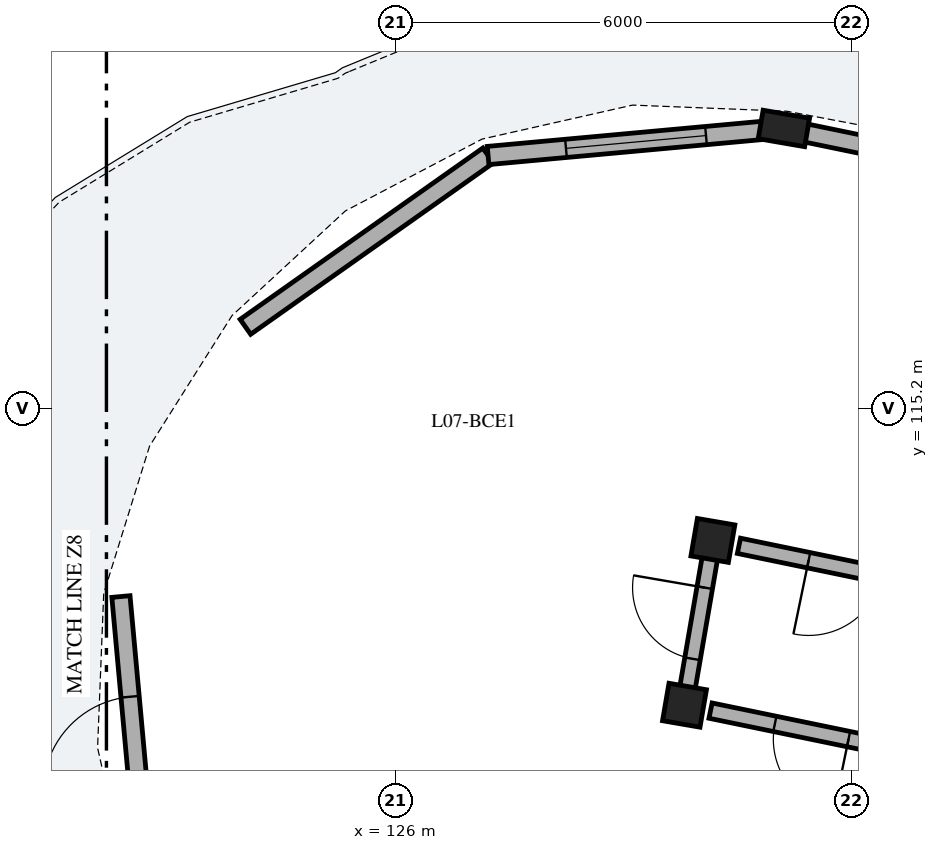
"""IFC4 building model, lengths in metres.
Left out: names, types, materials, properties, quantities, classifications, styles, units other than length and angle.
Written with IfcOpenShell. Run it as: python <this file> out.ifc"""

import sys

from ifc_helpers import new_model, si_unit, direction, frame, frame_2d, origin, origin_2d, place, context, subcontext, project, spatial, rectangle, extrude, element, fill, save


model = new_model("IFC4")
c1 = context("Model", 3, precision=1e-05, world=origin(), true_north=direction((0.0, 1.0)))
c2 = subcontext(c1, "Body", "Model", "MODEL_VIEW")
j1 = project(units=[si_unit("LENGTHUNIT", "METRE"), si_unit("PLANEANGLEUNIT", "RADIAN")], contexts=[c1])
p1 = place(None, origin())
s1 = spatial("IfcSite", under=j1, at=p1, CompositionType="ELEMENT")
p2 = place(p1, origin())
s2 = spatial("IfcBuilding", under=s1, at=p2, CompositionType="ELEMENT")
p3 = place(p2, frame((0.0, 0.0, 25.64)))
s3 = spatial("IfcBuildingStorey", under=s2, at=p3, CompositionType="ELEMENT", Elevation=25.64)
for number, where, z_axis, x_axis in (
    (1, (129.806, 111.297, 0.0), (0.0, 0.0, 1.0), (0.17, 0.985, 0.0)),
    (2, (130.179, 113.465, 0.0), (0.0, 0.0, 1.0), (0.17, 0.985, 0.0)),
):
    element("IfcColumn", number, at=place(p3, frame(where, z_axis=z_axis, x_axis=x_axis)), inside=s3, PredefinedType="COLUMN", context=c2, shape_type="SweptSolid", body=[
        extrude(rectangle(XDim=0.5, YDim=0.5, at=origin_2d()), origin(), (0.0, 0.0, 1.0), 3.11),
    ])
p4 = place(p3, frame((131.113, 118.885, 0.0), z_axis=(0.0, 0.0, 1.0), x_axis=(0.169827230012, 0.985473851478, 0.0)))
e3 = element("IfcColumn", 3, at=p4, inside=s3, PredefinedType="PILASTER", context=c2, shape_type="SweptSolid", body=[
    extrude(rectangle(XDim=0.38, YDim=0.62, at=origin_2d()), origin(), (0.0, 0.0, 1.0), 3.11),
])
p5 = place(p3, frame((134.742, 118.135, 0.0), z_axis=(0.0, 0.0, 1.0), x_axis=(-0.97933807536, 0.202229904193, 0.0)))
e4 = element("IfcWall", 4, at=p5, inside=s3, PredefinedType="SOLIDWALL", context=c2, shape_type="SweptSolid", body=[
    extrude(rectangle(XDim=3.546, YDim=0.24, at=frame_2d((1.773, 0.0))), origin(), (0.0, 0.0, 1.0), 2.355),
])
p6 = place(p5, frame((1.113, 0.0, 0.55)))
e5 = element("IfcOpeningElement", 5, at=p6, cuts=e4, PredefinedType="OPENING", context=c2, shape_type="SweptSolid", body=[
    extrude(rectangle(XDim=1.32, YDim=1.585, at=frame_2d((0.66, 0.792))), frame((0.0, 0.13, 0.0), z_axis=(0.0, -1.0, 0.0), x_axis=(1.0, 0.0, 0.0)), (0.0, 0.0, 1.0), 0.26),
])
p7 = place(p3, frame((122.746, 108.835, 0.0), z_axis=(0.0, 0.0, 1.0), x_axis=(-0.091020141047, 0.995849051776, 0.0)))
e6 = element("IfcWall", 6, at=p7, inside=s3, PredefinedType="SOLIDWALL", context=c2, shape_type="SweptSolid", body=[
    extrude(rectangle(XDim=3.908, YDim=0.24, at=frame_2d((1.954, 0.0))), origin(), (0.0, 0.0, 1.0), 2.355),
])
p8 = place(p7, frame((1.324, 0.0, 0.0)))
e7 = element("IfcOpeningElement", 7, at=p8, cuts=e6, PredefinedType="OPENING", context=c2, shape_type="SweptSolid", body=[
    extrude(rectangle(XDim=1.26, YDim=2.18, at=frame_2d((0.63, 1.09))), frame((0.0, 0.13, 0.0), z_axis=(0.0, -1.0, 0.0), x_axis=(1.0, 0.0, 0.0)), (0.0, 0.0, 1.0), 0.26),
])
p9 = place(p3, frame((124.029, 116.275, 0.0), z_axis=(0.0, 0.0, 1.0), x_axis=(0.816903802512, 0.576773939634, 0.0)))
e8 = element("IfcWall", 8, at=p9, inside=s3, PredefinedType="SOLIDWALL", context=c2, shape_type="SweptSolid", body=[
    extrude(rectangle(XDim=3.908, YDim=0.24, at=frame_2d((1.954, 0.0))), origin(), (0.0, 0.0, 1.0), 2.355),
])
p10 = place(p3, frame((127.221, 118.529, 0.0), z_axis=(0.0, 0.0, 1.0), x_axis=(0.995849569279, 0.091014478888, 0.0)))
e9 = element("IfcWall", 9, at=p10, inside=s3, PredefinedType="SOLIDWALL", context=c2, shape_type="SweptSolid", body=[
    extrude(rectangle(XDim=3.908, YDim=0.24, at=frame_2d((1.954, 0.0))), origin(), (0.0, 0.0, 1.0), 2.355),
])
p11 = place(p10, frame((1.029, 0.0, 0.4)))
e10 = element("IfcOpeningElement", 10, at=p11, cuts=e9, PredefinedType="OPENING", context=c2, shape_type="SweptSolid", body=[
    extrude(rectangle(XDim=1.85, YDim=1.72, at=frame_2d((0.925, 0.86))), frame((0.0, 0.13, 0.0), z_axis=(0.0, -1.0, 0.0), x_axis=(1.0, 0.0, 0.0)), (0.0, 0.0, 1.0), 0.26),
])
p12 = place(p3, frame((133.326, 112.815, 0.0), z_axis=(0.0, 0.0, 1.0), x_axis=(-0.979348418612, 0.202179808492, 0.0)))
e11 = element("IfcWall", 11, at=p12, inside=s3, PredefinedType="PARTITIONING", context=c2, shape_type="SweptSolid", body=[
    extrude(rectangle(XDim=2.863, YDim=0.205, at=frame_2d((1.432, 0.0))), origin(), (0.0, 0.0, 1.0), 2.37),
])
p13 = place(p12, frame((0.937, 0.0, 0.0)))
e12 = element("IfcOpeningElement", 12, at=p13, cuts=e11, PredefinedType="OPENING", context=c2, shape_type="SweptSolid", body=[
    extrude(rectangle(XDim=0.99, YDim=2.16, at=frame_2d((0.495, 1.08))), frame((0.0, 0.113, 0.0), z_axis=(0.0, -1.0, 0.0), x_axis=(1.0, 0.0, 0.0)), (0.0, 0.0, 1.0), 0.225),
])
p14 = place(p3, frame((132.81, 110.677, 0.0), z_axis=(0.0, 0.0, 1.0), x_axis=(-0.979349423541, 0.202174940608, 0.0)))
e13 = element("IfcWall", 13, at=p14, inside=s3, PredefinedType="PARTITIONING", context=c2, shape_type="SweptSolid", body=[
    extrude(rectangle(XDim=2.718, YDim=0.205, at=frame_2d((1.359, 0.0))), origin(), (0.0, 0.0, 1.0), 2.37),
])
p15 = place(p14, frame((0.864, 0.0, 0.0)))
e14 = element("IfcOpeningElement", 14, at=p15, cuts=e13, PredefinedType="OPENING", context=c2, shape_type="SweptSolid", body=[
    extrude(rectangle(XDim=0.99, YDim=2.16, at=frame_2d((0.495, 1.08))), frame((0.0, 0.113, 0.0), z_axis=(0.0, -1.0, 0.0), x_axis=(1.0, 0.0, 0.0)), (0.0, 0.0, 1.0), 0.225),
])
p16 = place(p3, frame((129.814, 111.346, 0.0), z_axis=(0.0, 0.0, 1.0), x_axis=(0.169864088707, 0.98546749889, 0.0)))
e15 = element("IfcWall", 15, at=p16, inside=s3, PredefinedType="PARTITIONING", context=c2, shape_type="SweptSolid", body=[
    extrude(rectangle(XDim=2.1, YDim=0.205, at=frame_2d((1.05, 0.0))), origin(), (0.0, 0.0, 1.0), 2.37),
])
p17 = place(p16, frame((0.57, 0.0, 0.0)))
e16 = element("IfcOpeningElement", 16, at=p17, cuts=e15, PredefinedType="OPENING", context=c2, shape_type="SweptSolid", body=[
    extrude(rectangle(XDim=0.95, YDim=2.13, at=frame_2d((0.475, 1.065))), frame((0.0, 0.113, 0.0), z_axis=(0.0, -1.0, 0.0), x_axis=(1.0, 0.0, 0.0)), (0.0, 0.0, 1.0), 0.225),
])
p18 = place(p8, origin())
e17 = element("IfcDoor", 17, at=p18, inside=s3, OperationType="SINGLE_SWING_LEFT", PredefinedType="DOOR", context=c2, shape_type="SweptSolid", body=[
    extrude(rectangle(XDim=1.26, YDim=2.18, at=frame_2d((0.63, 1.09))), frame((0.0, 0.025, 0.0), z_axis=(0.0, -1.0, 0.0), x_axis=(1.0, 0.0, 0.0)), (0.0, 0.0, 1.0), 0.05),
])
fill(e7, e17)
p19 = place(p11, origin())
e18 = element("IfcWindow", 18, at=p19, inside=s3, PartitioningType="SINGLE_PANEL", PredefinedType="WINDOW", context=c2, shape_type="SweptSolid", body=[
    extrude(rectangle(XDim=1.85, YDim=1.72, at=frame_2d((0.925, 0.86))), frame((0.0, 0.03, 0.0), z_axis=(0.0, -1.0, 0.0), x_axis=(1.0, 0.0, 0.0)), (0.0, 0.0, 1.0), 0.06),
])
fill(e10, e18)
p20 = place(p13, origin())
e19 = element("IfcDoor", 19, at=p20, inside=s3, OperationType="SINGLE_SWING_RIGHT", PredefinedType="DOOR", context=c2, shape_type="SweptSolid", body=[
    extrude(rectangle(XDim=0.99, YDim=2.16, at=frame_2d((0.495, 1.08))), frame((0.0, 0.025, 0.0), z_axis=(0.0, -1.0, 0.0), x_axis=(1.0, 0.0, 0.0)), (0.0, 0.0, 1.0), 0.05),
])
fill(e12, e19)
p21 = place(p15, origin())
e20 = element("IfcDoor", 20, at=p21, inside=s3, OperationType="SINGLE_SWING_LEFT", PredefinedType="DOOR", context=c2, shape_type="SweptSolid", body=[
    extrude(rectangle(XDim=0.99, YDim=2.16, at=frame_2d((0.495, 1.08))), frame((0.0, 0.025, 0.0), z_axis=(0.0, -1.0, 0.0), x_axis=(1.0, 0.0, 0.0)), (0.0, 0.0, 1.0), 0.05),
])
fill(e14, e20)
p22 = place(p17, origin())
e21 = element("IfcDoor", 21, at=p22, inside=s3, OperationType="SINGLE_SWING_RIGHT", PredefinedType="DOOR", context=c2, shape_type="SweptSolid", body=[
    extrude(rectangle(XDim=0.95, YDim=2.13, at=frame_2d((0.475, 1.065))), frame((0.0, 0.025, 0.0), z_axis=(0.0, -1.0, 0.0), x_axis=(1.0, 0.0, 0.0)), (0.0, 0.0, 1.0), 0.05),
])
fill(e16, e21)
save(model, sys.argv[1])
